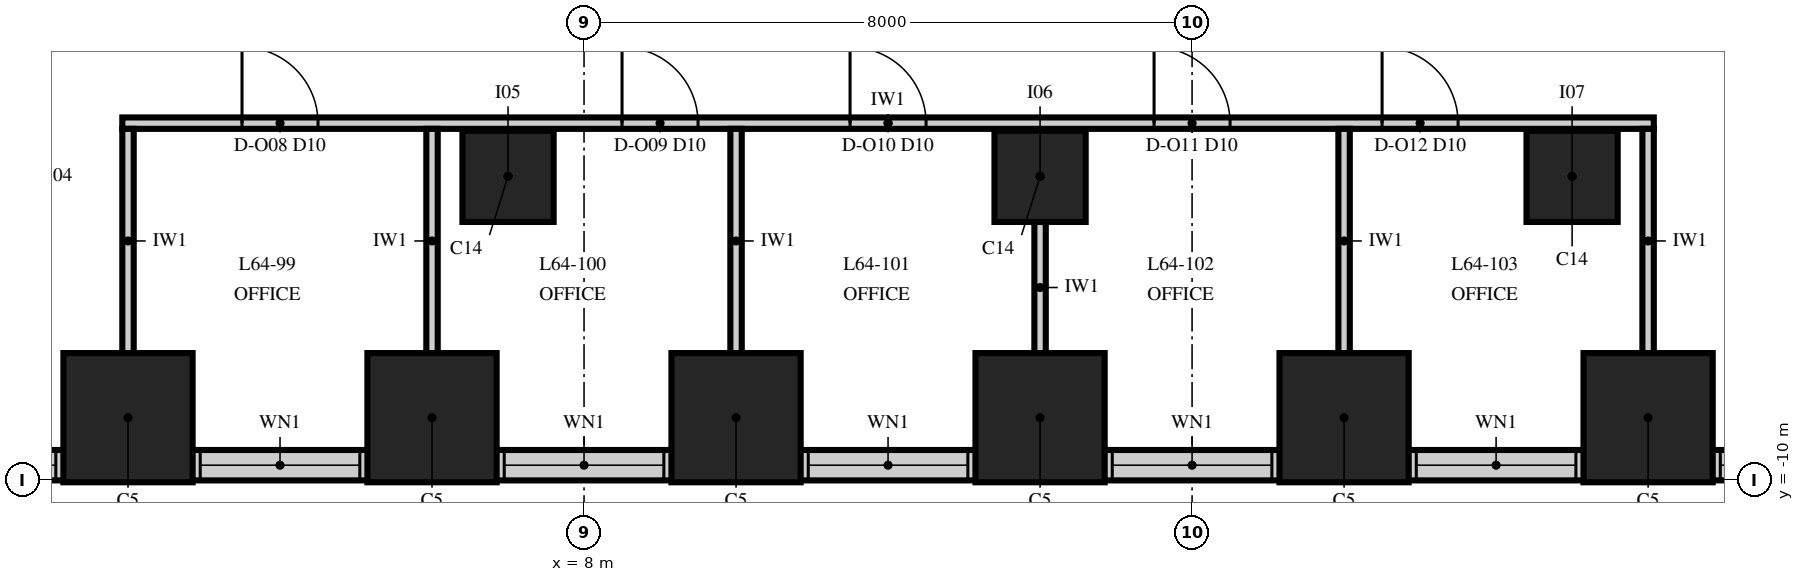
"""IFC4 building model, lengths in metres.
Left out: names, types, materials, properties, quantities, classifications, styles, units other than length and angle.
Written with IfcOpenShell. Run it as: python <this file> out.ifc"""

import sys

from ifc_helpers import new_model, si_unit, direction, frame, frame_2d, origin, origin_2d, place, context, subcontext, project, spatial, rectangle, extrude, element, fill, save


model = new_model("IFC4")
c1 = context("Model", 3, precision=1e-05, world=origin(), true_north=direction((0.0, 1.0)))
c2 = subcontext(c1, "Body", "Model", "MODEL_VIEW")
j1 = project(units=[si_unit("LENGTHUNIT", "METRE"), si_unit("PLANEANGLEUNIT", "RADIAN")], contexts=[c1])
p1 = place(None, origin())
s1 = spatial("IfcSite", under=j1, at=p1, CompositionType="ELEMENT")
p2 = place(p1, origin())
s2 = spatial("IfcBuilding", under=s1, at=p2, CompositionType="ELEMENT")
p3 = place(p2, frame((0.0, 0.0, 276.0)))
s3 = spatial("IfcBuildingStorey", under=s2, at=p3, CompositionType="ELEMENT", Elevation=276.0)
for number, where, z_axis, x_axis in (
    (1, (2.0, -9.175, 0.0), (0.0, 0.0, 1.0), (1.0, 0.0, 0.0)),
    (2, (6.0, -9.175, 0.0), (0.0, 0.0, 1.0), (1.0, 0.0, 0.0)),
    (3, (10.0, -9.175, 0.0), (0.0, 0.0, 1.0), (1.0, 0.0, 0.0)),
    (4, (14.0, -9.175, 0.0), (0.0, 0.0, 1.0), (1.0, 0.0, 0.0)),
    (5, (18.0, -9.175, 0.0), (0.0, 0.0, 1.0), (1.0, 0.0, 0.0)),
    (6, (22.0, -9.175, 0.0), (0.0, 0.0, 1.0), (1.0, 0.0, 0.0)),
):
    element("IfcColumn", number, at=place(p3, frame(where, z_axis=z_axis, x_axis=x_axis)), inside=s3, PredefinedType="COLUMN", context=c2, shape_type="SweptSolid", body=[
        extrude(rectangle(XDim=1.7, YDim=1.7, at=origin_2d()), origin(), (0.0, 0.0, 1.0), 4.0),
    ])
for number, where, z_axis, x_axis in (
    (7, (7.0, -6.0, 0.0), (0.0, 0.0, 1.0), (1.0, 0.0, 0.0)),
    (8, (14.0, -6.0, 0.0), (0.0, 0.0, 1.0), (1.0, 0.0, 0.0)),
    (9, (21.0, -6.0, 0.0), (0.0, 0.0, 1.0), (1.0, 0.0, 0.0)),
):
    element("IfcColumn", number, at=place(p3, frame(where, z_axis=z_axis, x_axis=x_axis)), inside=s3, PredefinedType="COLUMN", context=c2, shape_type="SweptSolid", body=[
        extrude(rectangle(XDim=1.2, YDim=1.2, at=origin_2d()), origin(), (0.0, 0.0, 1.0), 4.0),
    ])
p4 = place(p3, frame((-26.0, -9.8, 0.0), z_axis=(0.0, 0.0, 1.0), x_axis=(1.0, 0.0, 0.0)))
e10 = element("IfcWall", 10, at=p4, inside=s3, PredefinedType="SOLIDWALL", context=c2, shape_type="SweptSolid", body=[
    extrude(rectangle(XDim=52.0, YDim=0.4, at=frame_2d((26.0, 0.0))), origin(), (0.0, 0.0, 1.0), 2.0),
])
p5 = place(p4, frame((0.95, 0.0, 0.8)))
e11 = element("IfcOpeningElement", 11, at=p5, cuts=e10, PredefinedType="OPENING", context=c2, shape_type="SweptSolid", body=[
    extrude(rectangle(XDim=2.1, YDim=1.15, at=frame_2d((1.05, 0.575))), frame((0.0, 0.215, 0.0), z_axis=(0.0, -1.0, 0.0), x_axis=(1.0, 0.0, 0.0)), (0.0, 0.0, 1.0), 0.43),
])
p6 = place(p4, frame((4.95, 0.0, 0.8)))
e12 = element("IfcOpeningElement", 12, at=p6, cuts=e10, PredefinedType="OPENING", context=c2, shape_type="SweptSolid", body=[
    extrude(rectangle(XDim=2.1, YDim=1.15, at=frame_2d((1.05, 0.575))), frame((0.0, 0.215, 0.0), z_axis=(0.0, -1.0, 0.0), x_axis=(1.0, 0.0, 0.0)), (0.0, 0.0, 1.0), 0.43),
])
p7 = place(p4, frame((8.95, 0.0, 0.8)))
e13 = element("IfcOpeningElement", 13, at=p7, cuts=e10, PredefinedType="OPENING", context=c2, shape_type="SweptSolid", body=[
    extrude(rectangle(XDim=2.1, YDim=1.15, at=frame_2d((1.05, 0.575))), frame((0.0, 0.215, 0.0), z_axis=(0.0, -1.0, 0.0), x_axis=(1.0, 0.0, 0.0)), (0.0, 0.0, 1.0), 0.43),
])
p8 = place(p4, frame((12.95, 0.0, 0.8)))
e14 = element("IfcOpeningElement", 14, at=p8, cuts=e10, PredefinedType="OPENING", context=c2, shape_type="SweptSolid", body=[
    extrude(rectangle(XDim=2.1, YDim=1.15, at=frame_2d((1.05, 0.575))), frame((0.0, 0.215, 0.0), z_axis=(0.0, -1.0, 0.0), x_axis=(1.0, 0.0, 0.0)), (0.0, 0.0, 1.0), 0.43),
])
p9 = place(p4, frame((16.95, 0.0, 0.8)))
e15 = element("IfcOpeningElement", 15, at=p9, cuts=e10, PredefinedType="OPENING", context=c2, shape_type="SweptSolid", body=[
    extrude(rectangle(XDim=2.1, YDim=1.15, at=frame_2d((1.05, 0.575))), frame((0.0, 0.215, 0.0), z_axis=(0.0, -1.0, 0.0), x_axis=(1.0, 0.0, 0.0)), (0.0, 0.0, 1.0), 0.43),
])
p10 = place(p4, frame((20.95, 0.0, 0.8)))
e16 = element("IfcOpeningElement", 16, at=p10, cuts=e10, PredefinedType="OPENING", context=c2, shape_type="SweptSolid", body=[
    extrude(rectangle(XDim=2.1, YDim=1.15, at=frame_2d((1.05, 0.575))), frame((0.0, 0.215, 0.0), z_axis=(0.0, -1.0, 0.0), x_axis=(1.0, 0.0, 0.0)), (0.0, 0.0, 1.0), 0.43),
])
p11 = place(p4, frame((24.95, 0.0, 0.8)))
e17 = element("IfcOpeningElement", 17, at=p11, cuts=e10, PredefinedType="OPENING", context=c2, shape_type="SweptSolid", body=[
    extrude(rectangle(XDim=2.1, YDim=1.15, at=frame_2d((1.05, 0.575))), frame((0.0, 0.215, 0.0), z_axis=(0.0, -1.0, 0.0), x_axis=(1.0, 0.0, 0.0)), (0.0, 0.0, 1.0), 0.43),
])
p12 = place(p4, frame((28.95, 0.0, 0.8)))
e18 = element("IfcOpeningElement", 18, at=p12, cuts=e10, PredefinedType="OPENING", context=c2, shape_type="SweptSolid", body=[
    extrude(rectangle(XDim=2.1, YDim=1.15, at=frame_2d((1.05, 0.575))), frame((0.0, 0.215, 0.0), z_axis=(0.0, -1.0, 0.0), x_axis=(1.0, 0.0, 0.0)), (0.0, 0.0, 1.0), 0.43),
])
p13 = place(p4, frame((32.95, 0.0, 0.8)))
e19 = element("IfcOpeningElement", 19, at=p13, cuts=e10, PredefinedType="OPENING", context=c2, shape_type="SweptSolid", body=[
    extrude(rectangle(XDim=2.1, YDim=1.15, at=frame_2d((1.05, 0.575))), frame((0.0, 0.215, 0.0), z_axis=(0.0, -1.0, 0.0), x_axis=(1.0, 0.0, 0.0)), (0.0, 0.0, 1.0), 0.43),
])
p14 = place(p4, frame((36.95, 0.0, 0.8)))
e20 = element("IfcOpeningElement", 20, at=p14, cuts=e10, PredefinedType="OPENING", context=c2, shape_type="SweptSolid", body=[
    extrude(rectangle(XDim=2.1, YDim=1.15, at=frame_2d((1.05, 0.575))), frame((0.0, 0.215, 0.0), z_axis=(0.0, -1.0, 0.0), x_axis=(1.0, 0.0, 0.0)), (0.0, 0.0, 1.0), 0.43),
])
p15 = place(p4, frame((40.95, 0.0, 0.8)))
e21 = element("IfcOpeningElement", 21, at=p15, cuts=e10, PredefinedType="OPENING", context=c2, shape_type="SweptSolid", body=[
    extrude(rectangle(XDim=2.1, YDim=1.15, at=frame_2d((1.05, 0.575))), frame((0.0, 0.215, 0.0), z_axis=(0.0, -1.0, 0.0), x_axis=(1.0, 0.0, 0.0)), (0.0, 0.0, 1.0), 0.43),
])
p16 = place(p4, frame((44.95, 0.0, 0.8)))
e22 = element("IfcOpeningElement", 22, at=p16, cuts=e10, PredefinedType="OPENING", context=c2, shape_type="SweptSolid", body=[
    extrude(rectangle(XDim=2.1, YDim=1.15, at=frame_2d((1.05, 0.575))), frame((0.0, 0.215, 0.0), z_axis=(0.0, -1.0, 0.0), x_axis=(1.0, 0.0, 0.0)), (0.0, 0.0, 1.0), 0.43),
])
p17 = place(p4, frame((48.95, 0.0, 0.8)))
e23 = element("IfcOpeningElement", 23, at=p17, cuts=e10, PredefinedType="OPENING", context=c2, shape_type="SweptSolid", body=[
    extrude(rectangle(XDim=2.1, YDim=1.15, at=frame_2d((1.05, 0.575))), frame((0.0, 0.215, 0.0), z_axis=(0.0, -1.0, 0.0), x_axis=(1.0, 0.0, 0.0)), (0.0, 0.0, 1.0), 0.43),
])
p18 = place(p3, frame((1.925, -5.3, 0.0), z_axis=(0.0, 0.0, 1.0), x_axis=(1.0, 0.0, 0.0)))
e24 = element("IfcWall", 24, at=p18, inside=s3, PredefinedType="PARTITIONING", context=c2, shape_type="SweptSolid", body=[
    extrude(rectangle(XDim=20.15, YDim=0.15, at=frame_2d((10.075, 0.0))), origin(), (0.0, 0.0, 1.0), 3.23),
])
p19 = place(p18, frame((1.575, 0.0, 0.0)))
e25 = element("IfcOpeningElement", 25, at=p19, cuts=e24, PredefinedType="OPENING", context=c2, shape_type="SweptSolid", body=[
    extrude(rectangle(XDim=1.0, YDim=2.3, at=frame_2d((0.5, 1.15))), frame((0.0, 0.09, 0.0), z_axis=(0.0, -1.0, 0.0), x_axis=(1.0, 0.0, 0.0)), (0.0, 0.0, 1.0), 0.18),
])
p20 = place(p18, frame((6.575, 0.0, 0.0)))
e26 = element("IfcOpeningElement", 26, at=p20, cuts=e24, PredefinedType="OPENING", context=c2, shape_type="SweptSolid", body=[
    extrude(rectangle(XDim=1.0, YDim=2.3, at=frame_2d((0.5, 1.15))), frame((0.0, 0.09, 0.0), z_axis=(0.0, -1.0, 0.0), x_axis=(1.0, 0.0, 0.0)), (0.0, 0.0, 1.0), 0.18),
])
p21 = place(p18, frame((9.575, 0.0, 0.0)))
e27 = element("IfcOpeningElement", 27, at=p21, cuts=e24, PredefinedType="OPENING", context=c2, shape_type="SweptSolid", body=[
    extrude(rectangle(XDim=1.0, YDim=2.3, at=frame_2d((0.5, 1.15))), frame((0.0, 0.09, 0.0), z_axis=(0.0, -1.0, 0.0), x_axis=(1.0, 0.0, 0.0)), (0.0, 0.0, 1.0), 0.18),
])
p22 = place(p18, frame((13.575, 0.0, 0.0)))
e28 = element("IfcOpeningElement", 28, at=p22, cuts=e24, PredefinedType="OPENING", context=c2, shape_type="SweptSolid", body=[
    extrude(rectangle(XDim=1.0, YDim=2.3, at=frame_2d((0.5, 1.15))), frame((0.0, 0.09, 0.0), z_axis=(0.0, -1.0, 0.0), x_axis=(1.0, 0.0, 0.0)), (0.0, 0.0, 1.0), 0.18),
])
p23 = place(p18, frame((16.575, 0.0, 0.0)))
e29 = element("IfcOpeningElement", 29, at=p23, cuts=e24, PredefinedType="OPENING", context=c2, shape_type="SweptSolid", body=[
    extrude(rectangle(XDim=1.0, YDim=2.3, at=frame_2d((0.5, 1.15))), frame((0.0, 0.09, 0.0), z_axis=(0.0, -1.0, 0.0), x_axis=(1.0, 0.0, 0.0)), (0.0, 0.0, 1.0), 0.18),
])
for number, where, z_axis, x_axis in (
    (30, (2.0, -8.325, 0.0), (0.0, 0.0, 1.0), (0.0, 1.0, 0.0)),
    (31, (6.0, -8.325, 0.0), (0.0, 0.0, 1.0), (0.0, 1.0, 0.0)),
    (32, (10.0, -8.325, 0.0), (0.0, 0.0, 1.0), (0.0, 1.0, 0.0)),
):
    element("IfcWall", number, at=place(p3, frame(where, z_axis=z_axis, x_axis=x_axis)), inside=s3, PredefinedType="PARTITIONING", context=c2, shape_type="SweptSolid", body=[
        extrude(rectangle(XDim=2.95, YDim=0.15, at=frame_2d((1.475, 0.0))), origin(), (0.0, 0.0, 1.0), 2.842),
    ])
p24 = place(p3, frame((14.0, -8.325, 0.0), z_axis=(0.0, 0.0, 1.0), x_axis=(0.0, 1.0, 0.0)))
e33 = element("IfcWall", 33, at=p24, inside=s3, PredefinedType="PARTITIONING", context=c2, shape_type="SweptSolid", body=[
    extrude(rectangle(XDim=1.725, YDim=0.15, at=frame_2d((0.862, 0.0))), origin(), (0.0, 0.0, 1.0), 3.23),
])
for number, where, z_axis, x_axis in (
    (34, (18.0, -8.325, 0.0), (0.0, 0.0, 1.0), (0.0, 1.0, 0.0)),
    (35, (22.0, -8.325, 0.0), (0.0, 0.0, 1.0), (0.0, 1.0, 0.0)),
):
    element("IfcWall", number, at=place(p3, frame(where, z_axis=z_axis, x_axis=x_axis)), inside=s3, PredefinedType="PARTITIONING", context=c2, shape_type="SweptSolid", body=[
        extrude(rectangle(XDim=2.95, YDim=0.15, at=frame_2d((1.475, 0.0))), origin(), (0.0, 0.0, 1.0), 2.842),
    ])
p25 = place(p11, origin())
e36 = element("IfcWindow", 36, at=p25, inside=s3, PartitioningType="SINGLE_PANEL", PredefinedType="WINDOW", context=c2, shape_type="SweptSolid", body=[
    extrude(rectangle(XDim=2.1, YDim=1.15, at=frame_2d((1.05, 0.575))), frame((0.0, 0.03, 0.0), z_axis=(0.0, -1.0, 0.0), x_axis=(1.0, 0.0, 0.0)), (0.0, 0.0, 1.0), 0.06),
])
fill(e17, e36)
p26 = place(p12, origin())
e37 = element("IfcWindow", 37, at=p26, inside=s3, PartitioningType="SINGLE_PANEL", PredefinedType="WINDOW", context=c2, shape_type="SweptSolid", body=[
    extrude(rectangle(XDim=2.1, YDim=1.15, at=frame_2d((1.05, 0.575))), frame((0.0, 0.03, 0.0), z_axis=(0.0, -1.0, 0.0), x_axis=(1.0, 0.0, 0.0)), (0.0, 0.0, 1.0), 0.06),
])
fill(e18, e37)
p27 = place(p13, origin())
e38 = element("IfcWindow", 38, at=p27, inside=s3, PartitioningType="SINGLE_PANEL", PredefinedType="WINDOW", context=c2, shape_type="SweptSolid", body=[
    extrude(rectangle(XDim=2.1, YDim=1.15, at=frame_2d((1.05, 0.575))), frame((0.0, 0.03, 0.0), z_axis=(0.0, -1.0, 0.0), x_axis=(1.0, 0.0, 0.0)), (0.0, 0.0, 1.0), 0.06),
])
fill(e19, e38)
p28 = place(p14, origin())
e39 = element("IfcWindow", 39, at=p28, inside=s3, PartitioningType="SINGLE_PANEL", PredefinedType="WINDOW", context=c2, shape_type="SweptSolid", body=[
    extrude(rectangle(XDim=2.1, YDim=1.15, at=frame_2d((1.05, 0.575))), frame((0.0, 0.03, 0.0), z_axis=(0.0, -1.0, 0.0), x_axis=(1.0, 0.0, 0.0)), (0.0, 0.0, 1.0), 0.06),
])
fill(e20, e39)
p29 = place(p15, origin())
e40 = element("IfcWindow", 40, at=p29, inside=s3, PartitioningType="SINGLE_PANEL", PredefinedType="WINDOW", context=c2, shape_type="SweptSolid", body=[
    extrude(rectangle(XDim=2.1, YDim=1.15, at=frame_2d((1.05, 0.575))), frame((0.0, 0.03, 0.0), z_axis=(0.0, -1.0, 0.0), x_axis=(1.0, 0.0, 0.0)), (0.0, 0.0, 1.0), 0.06),
])
fill(e21, e40)
p30 = place(p16, origin())
e41 = element("IfcWindow", 41, at=p30, inside=s3, PartitioningType="SINGLE_PANEL", PredefinedType="WINDOW", context=c2, shape_type="SweptSolid", body=[
    extrude(rectangle(XDim=2.1, YDim=1.15, at=frame_2d((1.05, 0.575))), frame((0.0, 0.03, 0.0), z_axis=(0.0, -1.0, 0.0), x_axis=(1.0, 0.0, 0.0)), (0.0, 0.0, 1.0), 0.06),
])
fill(e22, e41)
p31 = place(p17, origin())
e42 = element("IfcWindow", 42, at=p31, inside=s3, PartitioningType="SINGLE_PANEL", PredefinedType="WINDOW", context=c2, shape_type="SweptSolid", body=[
    extrude(rectangle(XDim=2.1, YDim=1.15, at=frame_2d((1.05, 0.575))), frame((0.0, 0.03, 0.0), z_axis=(0.0, -1.0, 0.0), x_axis=(1.0, 0.0, 0.0)), (0.0, 0.0, 1.0), 0.06),
])
fill(e23, e42)
p32 = place(p19, origin())
e43 = element("IfcDoor", 43, at=p32, inside=s3, OperationType="SINGLE_SWING_LEFT", PredefinedType="DOOR", context=c2, shape_type="SweptSolid", body=[
    extrude(rectangle(XDim=1.0, YDim=2.3, at=frame_2d((0.5, 1.15))), frame((0.0, 0.075, 0.0), z_axis=(0.0, -1.0, 0.0), x_axis=(1.0, 0.0, 0.0)), (0.0, 0.0, 1.0), 0.149),
])
fill(e25, e43)
p33 = place(p20, origin())
e44 = element("IfcDoor", 44, at=p33, inside=s3, OperationType="SINGLE_SWING_LEFT", PredefinedType="DOOR", context=c2, shape_type="SweptSolid", body=[
    extrude(rectangle(XDim=1.0, YDim=2.3, at=frame_2d((0.5, 1.15))), frame((0.0, 0.075, 0.0), z_axis=(0.0, -1.0, 0.0), x_axis=(1.0, 0.0, 0.0)), (0.0, 0.0, 1.0), 0.149),
])
fill(e26, e44)
p34 = place(p21, origin())
e45 = element("IfcDoor", 45, at=p34, inside=s3, OperationType="SINGLE_SWING_LEFT", PredefinedType="DOOR", context=c2, shape_type="SweptSolid", body=[
    extrude(rectangle(XDim=1.0, YDim=2.3, at=frame_2d((0.5, 1.15))), frame((0.0, 0.075, 0.0), z_axis=(0.0, -1.0, 0.0), x_axis=(1.0, 0.0, 0.0)), (0.0, 0.0, 1.0), 0.149),
])
fill(e27, e45)
p35 = place(p22, origin())
e46 = element("IfcDoor", 46, at=p35, inside=s3, OperationType="SINGLE_SWING_LEFT", PredefinedType="DOOR", context=c2, shape_type="SweptSolid", body=[
    extrude(rectangle(XDim=1.0, YDim=2.3, at=frame_2d((0.5, 1.15))), frame((0.0, 0.075, 0.0), z_axis=(0.0, -1.0, 0.0), x_axis=(1.0, 0.0, 0.0)), (0.0, 0.0, 1.0), 0.149),
])
fill(e28, e46)
p36 = place(p23, origin())
e47 = element("IfcDoor", 47, at=p36, inside=s3, OperationType="SINGLE_SWING_LEFT", PredefinedType="DOOR", context=c2, shape_type="SweptSolid", body=[
    extrude(rectangle(XDim=1.0, YDim=2.3, at=frame_2d((0.5, 1.15))), frame((0.0, 0.075, 0.0), z_axis=(0.0, -1.0, 0.0), x_axis=(1.0, 0.0, 0.0)), (0.0, 0.0, 1.0), 0.149),
])
fill(e29, e47)
save(model, sys.argv[1])
